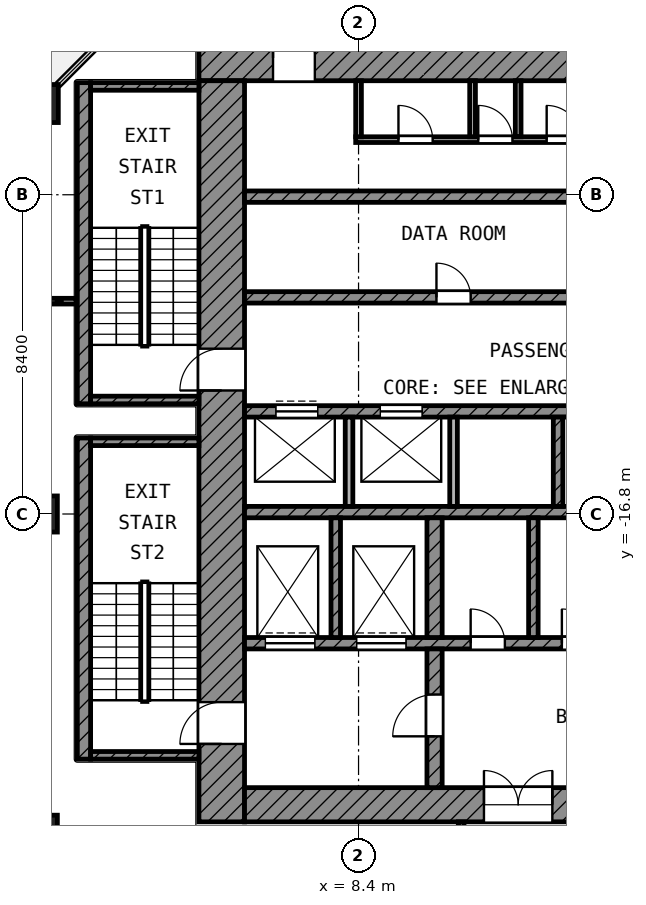
"""IFC4 building model, lengths in metres.
Left out: names, types, materials, properties, quantities, classifications, styles, units other than length and angle.
Written with IfcOpenShell. Run it as: python <this file> out.ifc"""

import sys

from ifc_helpers import new_model, si_unit, direction, frame, frame_2d, origin, origin_2d, place, context, subcontext, project, spatial, rectangle, extrude, element, fill, save


model = new_model("IFC4")
c1 = context("Model", 3, precision=1e-05, world=origin(), true_north=direction((0.0, 1.0)))
c2 = subcontext(c1, "Body", "Model", "MODEL_VIEW")
j1 = project(units=[si_unit("LENGTHUNIT", "METRE"), si_unit("PLANEANGLEUNIT", "RADIAN")], contexts=[c1])
p1 = place(None, origin())
s1 = spatial("IfcSite", under=j1, at=p1, CompositionType="ELEMENT")
p2 = place(p1, origin())
s2 = spatial("IfcBuilding", under=s1, at=p2, CompositionType="ELEMENT")
p3 = place(p2, frame((0.0, 0.0, 196.2)))
s3 = spatial("IfcBuildingStorey", under=s2, at=p3, CompositionType="ELEMENT", Elevation=196.2)
p4 = place(p3, frame((0.0, -6.0, 0.0), z_axis=(0.0, 0.0, 1.0), x_axis=(1.0, 0.0, 0.0)))
e1 = element("IfcColumn", 1, at=p4, inside=s3, PredefinedType="COLUMN", context=c2, shape_type="SweptSolid", body=[
    extrude(rectangle(XDim=1.0, YDim=1.0, at=origin_2d()), origin(), (0.0, 0.0, 1.0), 4.2),
])
for number, where, z_axis, x_axis in (
    (2, (0.0, -16.8, 0.0), (0.0, 0.0, 1.0), (1.0, 0.0, 0.0)),
    (3, (0.0, -25.2, 0.0), (0.0, 0.0, 1.0), (1.0, 0.0, 0.0)),
):
    element("IfcColumn", number, at=place(p3, frame(where, z_axis=z_axis, x_axis=x_axis)), inside=s3, PredefinedType="COLUMN", context=c2, shape_type="SweptSolid", body=[
        extrude(rectangle(XDim=0.95, YDim=0.95, at=origin_2d()), origin(), (0.0, 0.0, 1.0), 4.2),
    ])
p5 = place(p3, frame((4.2, -4.8, 0.0), z_axis=(0.0, 0.0, 1.0), x_axis=(1.0, 0.0, 0.0)))
e4 = element("IfcWall", 4, at=p5, inside=s3, PredefinedType="SHEAR", context=c2, shape_type="SweptSolid", body=[
    extrude(rectangle(XDim=20.7, YDim=1.2, at=frame_2d((10.35, 0.0))), origin(), (0.0, 0.0, 1.0), 3.6),
])
p6 = place(p5, frame((1.95, 0.0, 0.0)))
e5 = element("IfcOpeningElement", 5, at=p6, cuts=e4, PredefinedType="OPENING", context=c2, shape_type="SweptSolid", body=[
    extrude(rectangle(XDim=1.1, YDim=2.1, at=frame_2d((0.55, 1.05))), frame((0.0, 0.61, 0.0), z_axis=(0.0, -1.0, 0.0), x_axis=(1.0, 0.0, 0.0)), (0.0, 0.0, 1.0), 1.22),
])
p7 = place(p5, frame((17.95, 0.0, 0.0)))
e6 = element("IfcOpeningElement", 6, at=p7, cuts=e4, PredefinedType="OPENING", context=c2, shape_type="SweptSolid", body=[
    extrude(rectangle(XDim=1.1, YDim=2.1, at=frame_2d((0.55, 1.05))), frame((0.0, 0.61, 0.0), z_axis=(0.0, -1.0, 0.0), x_axis=(1.0, 0.0, 0.0)), (0.0, 0.0, 1.0), 1.22),
])
p8 = place(p3, frame((4.8, -24.9, 0.0), z_axis=(0.0, 0.0, 1.0), x_axis=(0.0, 1.0, 0.0)))
e7 = element("IfcWall", 7, at=p8, inside=s3, PredefinedType="SHEAR", context=c2, shape_type="SweptSolid", body=[
    extrude(rectangle(XDim=19.5, YDim=1.2, at=frame_2d((9.75, 0.0))), origin(), (0.0, 0.0, 1.0), 3.6),
])
p9 = place(p8, frame((11.35, 0.0, 0.0)))
e8 = element("IfcOpeningElement", 8, at=p9, cuts=e7, PredefinedType="OPENING", context=c2, shape_type="SweptSolid", body=[
    extrude(rectangle(XDim=1.1, YDim=2.1, at=frame_2d((0.55, 1.05))), frame((0.0, 0.61, 0.0), z_axis=(0.0, -1.0, 0.0), x_axis=(1.0, 0.0, 0.0)), (0.0, 0.0, 1.0), 1.22),
])
p10 = place(p8, frame((2.05, 0.0, 0.0)))
e9 = element("IfcOpeningElement", 9, at=p10, cuts=e7, PredefinedType="OPENING", context=c2, shape_type="SweptSolid", body=[
    extrude(rectangle(XDim=1.1, YDim=2.1, at=frame_2d((0.55, 1.05))), frame((0.0, 0.61, 0.0), z_axis=(0.0, -1.0, 0.0), x_axis=(1.0, 0.0, 0.0)), (0.0, 0.0, 1.0), 1.22),
])
p11 = place(p3, frame((5.4, -24.45, 0.0), z_axis=(0.0, 0.0, 1.0), x_axis=(1.0, 0.0, 0.0)))
e10 = element("IfcWall", 10, at=p11, inside=s3, PredefinedType="SHEAR", context=c2, shape_type="SweptSolid", body=[
    extrude(rectangle(XDim=18.6, YDim=0.9, at=frame_2d((9.3, 0.0))), origin(), (0.0, 0.0, 1.0), 3.6),
])
p12 = place(p11, frame((6.3, 0.0, 0.0)))
e11 = element("IfcOpeningElement", 11, at=p12, cuts=e10, PredefinedType="OPENING", context=c2, shape_type="SweptSolid", body=[
    extrude(rectangle(XDim=1.8, YDim=2.1, at=frame_2d((0.9, 1.05))), frame((0.0, 0.46, 0.0), z_axis=(0.0, -1.0, 0.0), x_axis=(1.0, 0.0, 0.0)), (0.0, 0.0, 1.0), 0.92),
])
p13 = place(p3, frame((5.4, -8.45, 0.0), z_axis=(0.0, 0.0, 1.0), x_axis=(1.0, 0.0, 0.0)))
e12 = element("IfcWall", 12, at=p13, inside=s3, PredefinedType="SHEAR", context=c2, shape_type="SweptSolid", body=[
    extrude(rectangle(XDim=16.65, YDim=0.3, at=frame_2d((8.325, 0.0))), origin(), (0.0, 0.0, 1.0), 3.6),
])
p14 = place(p3, frame((5.4, -11.1, 0.0), z_axis=(0.0, 0.0, 1.0), x_axis=(1.0, 0.0, 0.0)))
e13 = element("IfcWall", 13, at=p14, inside=s3, PredefinedType="SHEAR", context=c2, shape_type="SweptSolid", body=[
    extrude(rectangle(XDim=16.65, YDim=0.3, at=frame_2d((8.325, 0.0))), origin(), (0.0, 0.0, 1.0), 3.6),
])
p15 = place(p14, frame((11.825, 0.0, 0.0)))
e14 = element("IfcOpeningElement", 14, at=p15, cuts=e13, PredefinedType="OPENING", context=c2, shape_type="SweptSolid", body=[
    extrude(rectangle(XDim=1.1, YDim=2.1, at=frame_2d((0.55, 1.05))), frame((0.0, 0.16, 0.0), z_axis=(0.0, -1.0, 0.0), x_axis=(1.0, 0.0, 0.0)), (0.0, 0.0, 1.0), 0.32),
])
p16 = place(p14, frame((14.575, 0.0, 0.0)))
e15 = element("IfcOpeningElement", 15, at=p16, cuts=e13, PredefinedType="OPENING", context=c2, shape_type="SweptSolid", body=[
    extrude(rectangle(XDim=1.1, YDim=2.1, at=frame_2d((0.55, 1.05))), frame((0.0, 0.16, 0.0), z_axis=(0.0, -1.0, 0.0), x_axis=(1.0, 0.0, 0.0)), (0.0, 0.0, 1.0), 0.32),
])
p17 = place(p14, frame((5.05, 0.0, 0.0)))
e16 = element("IfcOpeningElement", 16, at=p17, cuts=e13, PredefinedType="OPENING", context=c2, shape_type="SweptSolid", body=[
    extrude(rectangle(XDim=0.9, YDim=2.1, at=frame_2d((0.45, 1.05))), frame((0.0, 0.16, 0.0), z_axis=(0.0, -1.0, 0.0), x_axis=(1.0, 0.0, 0.0)), (0.0, 0.0, 1.0), 0.32),
])
p18 = place(p3, frame((5.4, -14.1, 0.0), z_axis=(0.0, 0.0, 1.0), x_axis=(1.0, 0.0, 0.0)))
e17 = element("IfcWall", 17, at=p18, inside=s3, PredefinedType="SHEAR", context=c2, shape_type="SweptSolid", body=[
    extrude(rectangle(XDim=16.65, YDim=0.3, at=frame_2d((8.325, 0.0))), origin(), (0.0, 0.0, 1.0), 3.6),
])
p19 = place(p18, frame((0.825, 0.0, 0.0)))
e18 = element("IfcOpeningElement", 18, at=p19, cuts=e17, PredefinedType="OPENING", context=c2, shape_type="SweptSolid", body=[
    extrude(rectangle(XDim=1.1, YDim=2.1, at=frame_2d((0.55, 1.05))), frame((0.0, 0.16, 0.0), z_axis=(0.0, -1.0, 0.0), x_axis=(1.0, 0.0, 0.0)), (0.0, 0.0, 1.0), 0.32),
])
p20 = place(p18, frame((3.575, 0.0, 0.0)))
e19 = element("IfcOpeningElement", 19, at=p20, cuts=e17, PredefinedType="OPENING", context=c2, shape_type="SweptSolid", body=[
    extrude(rectangle(XDim=1.1, YDim=2.1, at=frame_2d((0.55, 1.05))), frame((0.0, 0.16, 0.0), z_axis=(0.0, -1.0, 0.0), x_axis=(1.0, 0.0, 0.0)), (0.0, 0.0, 1.0), 0.32),
])
p21 = place(p3, frame((5.4, -16.75, 0.0), z_axis=(0.0, 0.0, 1.0), x_axis=(1.0, 0.0, 0.0)))
e20 = element("IfcWall", 20, at=p21, inside=s3, PredefinedType="SHEAR", context=c2, shape_type="SweptSolid", body=[
    extrude(rectangle(XDim=16.65, YDim=0.3, at=frame_2d((8.325, 0.0))), origin(), (0.0, 0.0, 1.0), 3.6),
])
p22 = place(p3, frame((5.4, -20.2, 0.0), z_axis=(0.0, 0.0, 1.0), x_axis=(1.0, 0.0, 0.0)))
e21 = element("IfcWall", 21, at=p22, inside=s3, PredefinedType="SHEAR", context=c2, shape_type="SweptSolid", body=[
    extrude(rectangle(XDim=14.65, YDim=0.3, at=frame_2d((7.325, 0.0))), origin(), (0.0, 0.0, 1.0), 3.6),
])
p23 = place(p22, frame((10.55, 0.0, 0.0)))
e22 = element("IfcOpeningElement", 22, at=p23, cuts=e21, PredefinedType="OPENING", context=c2, shape_type="SweptSolid", body=[
    extrude(rectangle(XDim=1.3, YDim=2.1, at=frame_2d((0.65, 1.05))), frame((0.0, 0.16, 0.0), z_axis=(0.0, -1.0, 0.0), x_axis=(1.0, 0.0, 0.0)), (0.0, 0.0, 1.0), 0.32),
])
p24 = place(p22, frame((12.95, 0.0, 0.0)))
e23 = element("IfcOpeningElement", 23, at=p24, cuts=e21, PredefinedType="OPENING", context=c2, shape_type="SweptSolid", body=[
    extrude(rectangle(XDim=1.3, YDim=2.1, at=frame_2d((0.65, 1.05))), frame((0.0, 0.16, 0.0), z_axis=(0.0, -1.0, 0.0), x_axis=(1.0, 0.0, 0.0)), (0.0, 0.0, 1.0), 0.32),
])
p25 = place(p22, frame((0.55, 0.0, 0.0)))
e24 = element("IfcOpeningElement", 24, at=p25, cuts=e21, PredefinedType="OPENING", context=c2, shape_type="SweptSolid", body=[
    extrude(rectangle(XDim=1.3, YDim=2.1, at=frame_2d((0.65, 1.05))), frame((0.0, 0.16, 0.0), z_axis=(0.0, -1.0, 0.0), x_axis=(1.0, 0.0, 0.0)), (0.0, 0.0, 1.0), 0.32),
])
p26 = place(p22, frame((2.95, 0.0, 0.0)))
e25 = element("IfcOpeningElement", 25, at=p26, cuts=e21, PredefinedType="OPENING", context=c2, shape_type="SweptSolid", body=[
    extrude(rectangle(XDim=1.3, YDim=2.1, at=frame_2d((0.65, 1.05))), frame((0.0, 0.16, 0.0), z_axis=(0.0, -1.0, 0.0), x_axis=(1.0, 0.0, 0.0)), (0.0, 0.0, 1.0), 0.32),
])
p27 = place(p22, frame((5.95, 0.0, 0.0)))
e26 = element("IfcOpeningElement", 26, at=p27, cuts=e21, PredefinedType="OPENING", context=c2, shape_type="SweptSolid", body=[
    extrude(rectangle(XDim=0.9, YDim=2.1, at=frame_2d((0.45, 1.05))), frame((0.0, 0.16, 0.0), z_axis=(0.0, -1.0, 0.0), x_axis=(1.0, 0.0, 0.0)), (0.0, 0.0, 1.0), 0.32),
])
p28 = place(p22, frame((8.35, 0.0, 0.0)))
e27 = element("IfcOpeningElement", 27, at=p28, cuts=e21, PredefinedType="OPENING", context=c2, shape_type="SweptSolid", body=[
    extrude(rectangle(XDim=0.9, YDim=2.1, at=frame_2d((0.45, 1.05))), frame((0.0, 0.16, 0.0), z_axis=(0.0, -1.0, 0.0), x_axis=(1.0, 0.0, 0.0)), (0.0, 0.0, 1.0), 0.32),
])
p29 = place(p3, frame((10.4, -24.0, 0.0), z_axis=(0.0, 0.0, 1.0), x_axis=(0.0, 1.0, 0.0)))
e28 = element("IfcWall", 28, at=p29, inside=s3, PredefinedType="SHEAR", context=c2, shape_type="SweptSolid", body=[
    extrude(rectangle(XDim=3.65, YDim=0.4, at=frame_2d((1.825, 0.0))), origin(), (0.0, 0.0, 1.0), 3.6),
])
p30 = place(p29, frame((1.35, 0.0, 0.0)))
e29 = element("IfcOpeningElement", 29, at=p30, cuts=e28, PredefinedType="OPENING", context=c2, shape_type="SweptSolid", body=[
    extrude(rectangle(XDim=1.1, YDim=2.1, at=frame_2d((0.55, 1.05))), frame((0.0, 0.21, 0.0), z_axis=(0.0, -1.0, 0.0), x_axis=(1.0, 0.0, 0.0)), (0.0, 0.0, 1.0), 0.42),
])
p31 = place(p3, frame((10.4, -20.05, 0.0), z_axis=(0.0, 0.0, 1.0), x_axis=(0.0, 1.0, 0.0)))
e30 = element("IfcWall", 30, at=p31, inside=s3, PredefinedType="SHEAR", context=c2, shape_type="SweptSolid", body=[
    extrude(rectangle(XDim=3.15, YDim=0.4, at=frame_2d((1.575, 0.0))), origin(), (0.0, 0.0, 1.0), 3.6),
])
for number, where, z_axis, x_axis in (
    (31, (7.8, -20.05, 0.0), (0.0, 0.0, 1.0), (0.0, 1.0, 0.0)),
    (32, (13.0, -20.05, 0.0), (0.0, 0.0, 1.0), (0.0, 1.0, 0.0)),
):
    element("IfcWall", number, at=place(p3, frame(where, z_axis=z_axis, x_axis=x_axis)), inside=s3, PredefinedType="SHEAR", context=c2, shape_type="SweptSolid", body=[
        extrude(rectangle(XDim=3.15, YDim=0.25, at=frame_2d((1.575, 0.0))), origin(), (0.0, 0.0, 1.0), 3.6),
    ])
for number, where, z_axis, x_axis in (
    (33, (8.15, -16.6, 0.0), (0.0, 0.0, 1.0), (0.0, 1.0, 0.0)),
    (34, (10.9, -16.6, 0.0), (0.0, 0.0, 1.0), (0.0, 1.0, 0.0)),
):
    element("IfcWall", number, at=place(p3, frame(where, z_axis=z_axis, x_axis=x_axis)), inside=s3, PredefinedType="PARTITIONING", context=c2, shape_type="SweptSolid", body=[
        extrude(rectangle(XDim=2.35, YDim=0.2, at=frame_2d((1.175, 0.0))), origin(), (0.0, 0.0, 1.0), 3.6),
    ])
p32 = place(p3, frame((13.65, -16.6, 0.0), z_axis=(0.0, 0.0, 1.0), x_axis=(0.0, 1.0, 0.0)))
e35 = element("IfcWall", 35, at=p32, inside=s3, PredefinedType="SHEAR", context=c2, shape_type="SweptSolid", body=[
    extrude(rectangle(XDim=2.35, YDim=0.25, at=frame_2d((1.175, 0.0))), origin(), (0.0, 0.0, 1.0), 3.6),
])
p33 = place(p3, frame((8.325, -6.95, 0.0), z_axis=(0.0, 0.0, 1.0), x_axis=(1.0, 0.0, 0.0)))
e36 = element("IfcWall", 36, at=p33, inside=s3, PredefinedType="PARTITIONING", context=c2, shape_type="SweptSolid", body=[
    extrude(rectangle(XDim=12.75, YDim=0.15, at=frame_2d((6.375, 0.0))), origin(), (0.0, 0.0, 1.0), 3.6),
])
p34 = place(p33, frame((1.125, 0.0, 0.0)))
e37 = element("IfcOpeningElement", 37, at=p34, cuts=e36, PredefinedType="OPENING", context=c2, shape_type="SweptSolid", body=[
    extrude(rectangle(XDim=0.9, YDim=2.1, at=frame_2d((0.45, 1.05))), frame((0.0, 0.085, 0.0), z_axis=(0.0, -1.0, 0.0), x_axis=(1.0, 0.0, 0.0)), (0.0, 0.0, 1.0), 0.17),
])
p35 = place(p33, frame((3.225, 0.0, 0.0)))
e38 = element("IfcOpeningElement", 38, at=p35, cuts=e36, PredefinedType="OPENING", context=c2, shape_type="SweptSolid", body=[
    extrude(rectangle(XDim=0.9, YDim=2.1, at=frame_2d((0.45, 1.05))), frame((0.0, 0.085, 0.0), z_axis=(0.0, -1.0, 0.0), x_axis=(1.0, 0.0, 0.0)), (0.0, 0.0, 1.0), 0.17),
])
p36 = place(p33, frame((5.025, 0.0, 0.0)))
e39 = element("IfcOpeningElement", 39, at=p36, cuts=e36, PredefinedType="OPENING", context=c2, shape_type="SweptSolid", body=[
    extrude(rectangle(XDim=0.9, YDim=2.1, at=frame_2d((0.45, 1.05))), frame((0.0, 0.085, 0.0), z_axis=(0.0, -1.0, 0.0), x_axis=(1.0, 0.0, 0.0)), (0.0, 0.0, 1.0), 0.17),
])
p37 = place(p33, frame((7.425, 0.0, 0.0)))
e40 = element("IfcOpeningElement", 40, at=p37, cuts=e36, PredefinedType="OPENING", context=c2, shape_type="SweptSolid", body=[
    extrude(rectangle(XDim=0.9, YDim=2.1, at=frame_2d((0.45, 1.05))), frame((0.0, 0.085, 0.0), z_axis=(0.0, -1.0, 0.0), x_axis=(1.0, 0.0, 0.0)), (0.0, 0.0, 1.0), 0.17),
])
p38 = place(p33, frame((9.525, 0.0, 0.0)))
e41 = element("IfcOpeningElement", 41, at=p38, cuts=e36, PredefinedType="OPENING", context=c2, shape_type="SweptSolid", body=[
    extrude(rectangle(XDim=0.9, YDim=2.1, at=frame_2d((0.45, 1.05))), frame((0.0, 0.085, 0.0), z_axis=(0.0, -1.0, 0.0), x_axis=(1.0, 0.0, 0.0)), (0.0, 0.0, 1.0), 0.17),
])
p39 = place(p33, frame((11.325, 0.0, 0.0)))
e42 = element("IfcOpeningElement", 42, at=p39, cuts=e36, PredefinedType="OPENING", context=c2, shape_type="SweptSolid", body=[
    extrude(rectangle(XDim=0.9, YDim=2.1, at=frame_2d((0.45, 1.05))), frame((0.0, 0.085, 0.0), z_axis=(0.0, -1.0, 0.0), x_axis=(1.0, 0.0, 0.0)), (0.0, 0.0, 1.0), 0.17),
])
for number, where, z_axis, x_axis in (
    (43, (8.4, -6.875, 0.0), (0.0, 0.0, 1.0), (0.0, 1.0, 0.0)),
    (44, (11.4, -6.875, 0.0), (0.0, 0.0, 1.0), (0.0, 1.0, 0.0)),
    (45, (12.6, -6.875, 0.0), (0.0, 0.0, 1.0), (0.0, 1.0, 0.0)),
):
    element("IfcWall", number, at=place(p3, frame(where, z_axis=z_axis, x_axis=x_axis)), inside=s3, PredefinedType="PARTITIONING", context=c2, shape_type="SweptSolid", body=[
        extrude(rectangle(XDim=1.475, YDim=0.15, at=frame_2d((0.738, 0.0))), origin(), (0.0, 0.0, 1.0), 3.6),
    ])
p40 = place(p3, frame((1.175, -13.9, 0.0), z_axis=(0.0, 0.0, 1.0), x_axis=(0.0, 1.0, 0.0)))
e46 = element("IfcWall", 46, at=p40, inside=s3, PredefinedType="SHEAR", context=c2, shape_type="SweptSolid", body=[
    extrude(rectangle(XDim=8.45, YDim=0.35, at=frame_2d((4.225, 0.0))), origin(), (0.0, 0.0, 1.0), 3.6),
])
for number, where, z_axis, x_axis in (
    (47, (1.35, -5.55, 0.0), (0.0, 0.0, 1.0), (1.0, 0.0, 0.0)),
    (48, (1.35, -13.8, 0.0), (0.0, 0.0, 1.0), (1.0, 0.0, 0.0)),
):
    element("IfcWall", number, at=place(p3, frame(where, z_axis=z_axis, x_axis=x_axis)), inside=s3, PredefinedType="SHEAR", context=c2, shape_type="SweptSolid", body=[
        extrude(rectangle(XDim=2.85, YDim=0.2, at=frame_2d((1.425, 0.0))), origin(), (0.0, 0.0, 1.0), 3.6),
    ])
p41 = place(p3, frame((1.175, -23.25, 0.0), z_axis=(0.0, 0.0, 1.0), x_axis=(0.0, 1.0, 0.0)))
e49 = element("IfcWall", 49, at=p41, inside=s3, PredefinedType="SHEAR", context=c2, shape_type="SweptSolid", body=[
    extrude(rectangle(XDim=8.45, YDim=0.35, at=frame_2d((4.225, 0.0))), origin(), (0.0, 0.0, 1.0), 3.6),
])
for number, where, z_axis, x_axis in (
    (50, (1.35, -14.9, 0.0), (0.0, 0.0, 1.0), (1.0, 0.0, 0.0)),
    (51, (1.35, -23.15, 0.0), (0.0, 0.0, 1.0), (1.0, 0.0, 0.0)),
):
    element("IfcWall", number, at=place(p3, frame(where, z_axis=z_axis, x_axis=x_axis)), inside=s3, PredefinedType="SHEAR", context=c2, shape_type="SweptSolid", body=[
        extrude(rectangle(XDim=2.85, YDim=0.2, at=frame_2d((1.425, 0.0))), origin(), (0.0, 0.0, 1.0), 3.6),
    ])
p42 = place(p3, frame((0.08, -11.2, 0.0), z_axis=(0.0, 0.0, 1.0), x_axis=(1.0, 0.0, 0.0)))
e52 = element("IfcWall", 52, at=p42, inside=s3, PredefinedType="PARTITIONING", context=c2, shape_type="SweptSolid", body=[
    extrude(rectangle(XDim=0.89, YDim=0.15, at=frame_2d((0.445, 0.0))), origin(), (0.0, 0.0, 1.0), 3.6),
])
p43 = place(p3, frame((11.1, -29.398, 0.0), z_axis=(0.0, 0.0, 1.0), x_axis=(0.0, 1.0, 0.0)))
e53 = element("IfcWall", 53, at=p43, inside=s3, PredefinedType="PARTITIONING", context=c2, shape_type="SweptSolid", body=[
    extrude(rectangle(XDim=4.498, YDim=0.15, at=frame_2d((2.249, 0.0))), origin(), (0.0, 0.0, 1.0), 3.6),
])
p44 = place(p19, origin())
e54 = element("IfcDoor", 54, at=p44, inside=s3, OperationType="DOUBLE_DOOR_SLIDING", PredefinedType="DOOR", context=c2, shape_type="SweptSolid", body=[
    extrude(rectangle(XDim=1.1, YDim=2.1, at=frame_2d((0.55, 1.05))), frame((0.0, 0.025, 0.0), z_axis=(0.0, -1.0, 0.0), x_axis=(1.0, 0.0, 0.0)), (0.0, 0.0, 1.0), 0.05),
])
fill(e18, e54)
p45 = place(p20, origin())
e55 = element("IfcDoor", 55, at=p45, inside=s3, OperationType="DOUBLE_DOOR_SLIDING", PredefinedType="DOOR", context=c2, shape_type="SweptSolid", body=[
    extrude(rectangle(XDim=1.1, YDim=2.1, at=frame_2d((0.55, 1.05))), frame((0.0, 0.025, 0.0), z_axis=(0.0, -1.0, 0.0), x_axis=(1.0, 0.0, 0.0)), (0.0, 0.0, 1.0), 0.05),
])
fill(e19, e55)
p46 = place(p25, origin())
e56 = element("IfcDoor", 56, at=p46, inside=s3, OperationType="DOUBLE_DOOR_SLIDING", PredefinedType="DOOR", context=c2, shape_type="SweptSolid", body=[
    extrude(rectangle(XDim=1.3, YDim=2.1, at=frame_2d((0.65, 1.05))), frame((0.0, 0.025, 0.0), z_axis=(0.0, -1.0, 0.0), x_axis=(1.0, 0.0, 0.0)), (0.0, 0.0, 1.0), 0.05),
])
fill(e24, e56)
p47 = place(p26, origin())
e57 = element("IfcDoor", 57, at=p47, inside=s3, OperationType="DOUBLE_DOOR_SLIDING", PredefinedType="DOOR", context=c2, shape_type="SweptSolid", body=[
    extrude(rectangle(XDim=1.3, YDim=2.1, at=frame_2d((0.65, 1.05))), frame((0.0, 0.025, 0.0), z_axis=(0.0, -1.0, 0.0), x_axis=(1.0, 0.0, 0.0)), (0.0, 0.0, 1.0), 0.05),
])
fill(e25, e57)
p48 = place(p9, origin())
e58 = element("IfcDoor", 58, at=p48, inside=s3, OperationType="SINGLE_SWING_LEFT", PredefinedType="DOOR", context=c2, shape_type="SweptSolid", body=[
    extrude(rectangle(XDim=1.1, YDim=2.1, at=frame_2d((0.55, 1.05))), frame((0.0, 0.025, 0.0), z_axis=(0.0, -1.0, 0.0), x_axis=(1.0, 0.0, 0.0)), (0.0, 0.0, 1.0), 0.05),
])
fill(e8, e58)
p49 = place(p10, origin())
e59 = element("IfcDoor", 59, at=p49, inside=s3, OperationType="SINGLE_SWING_LEFT", PredefinedType="DOOR", context=c2, shape_type="SweptSolid", body=[
    extrude(rectangle(XDim=1.1, YDim=2.1, at=frame_2d((0.55, 1.05))), frame((0.0, 0.025, 0.0), z_axis=(0.0, -1.0, 0.0), x_axis=(1.0, 0.0, 0.0)), (0.0, 0.0, 1.0), 0.05),
])
fill(e9, e59)
p50 = place(p6, origin())
e60 = element("IfcDoor", 60, at=p50, inside=s3, OperationType="SINGLE_SWING_LEFT", PredefinedType="DOOR", context=c2, shape_type="SweptSolid", body=[
    extrude(rectangle(XDim=1.1, YDim=2.1, at=frame_2d((0.55, 1.05))), frame((0.0, 0.025, 0.0), z_axis=(0.0, -1.0, 0.0), x_axis=(1.0, 0.0, 0.0)), (0.0, 0.0, 1.0), 0.05),
])
fill(e5, e60)
p51 = place(p30, origin())
e61 = element("IfcDoor", 61, at=p51, inside=s3, OperationType="SINGLE_SWING_LEFT", PredefinedType="DOOR", context=c2, shape_type="SweptSolid", body=[
    extrude(rectangle(XDim=1.1, YDim=2.1, at=frame_2d((0.55, 1.05))), frame((0.0, 0.025, 0.0), z_axis=(0.0, -1.0, 0.0), x_axis=(1.0, 0.0, 0.0)), (0.0, 0.0, 1.0), 0.05),
])
fill(e29, e61)
p52 = place(p12, origin())
e62 = element("IfcDoor", 62, at=p52, inside=s3, OperationType="DOUBLE_DOOR_SINGLE_SWING", PredefinedType="DOOR", context=c2, shape_type="SweptSolid", body=[
    extrude(rectangle(XDim=1.8, YDim=2.1, at=frame_2d((0.9, 1.05))), frame((0.0, 0.025, 0.0), z_axis=(0.0, -1.0, 0.0), x_axis=(1.0, 0.0, 0.0)), (0.0, 0.0, 1.0), 0.05),
])
fill(e11, e62)
p53 = place(p34, origin())
e63 = element("IfcDoor", 63, at=p53, inside=s3, OperationType="SINGLE_SWING_LEFT", PredefinedType="DOOR", context=c2, shape_type="SweptSolid", body=[
    extrude(rectangle(XDim=0.9, YDim=2.1, at=frame_2d((0.45, 1.05))), frame((0.0, 0.025, 0.0), z_axis=(0.0, -1.0, 0.0), x_axis=(1.0, 0.0, 0.0)), (0.0, 0.0, 1.0), 0.05),
])
fill(e37, e63)
p54 = place(p35, origin())
e64 = element("IfcDoor", 64, at=p54, inside=s3, OperationType="SINGLE_SWING_LEFT", PredefinedType="DOOR", context=c2, shape_type="SweptSolid", body=[
    extrude(rectangle(XDim=0.9, YDim=2.1, at=frame_2d((0.45, 1.05))), frame((0.0, 0.025, 0.0), z_axis=(0.0, -1.0, 0.0), x_axis=(1.0, 0.0, 0.0)), (0.0, 0.0, 1.0), 0.05),
])
fill(e38, e64)
p55 = place(p36, origin())
e65 = element("IfcDoor", 65, at=p55, inside=s3, OperationType="SINGLE_SWING_LEFT", PredefinedType="DOOR", context=c2, shape_type="SweptSolid", body=[
    extrude(rectangle(XDim=0.9, YDim=2.1, at=frame_2d((0.45, 1.05))), frame((0.0, 0.025, 0.0), z_axis=(0.0, -1.0, 0.0), x_axis=(1.0, 0.0, 0.0)), (0.0, 0.0, 1.0), 0.05),
])
fill(e39, e65)
p56 = place(p27, origin())
e66 = element("IfcDoor", 66, at=p56, inside=s3, OperationType="SINGLE_SWING_LEFT", PredefinedType="DOOR", context=c2, shape_type="SweptSolid", body=[
    extrude(rectangle(XDim=0.9, YDim=2.1, at=frame_2d((0.45, 1.05))), frame((0.0, 0.025, 0.0), z_axis=(0.0, -1.0, 0.0), x_axis=(1.0, 0.0, 0.0)), (0.0, 0.0, 1.0), 0.05),
])
fill(e26, e66)
p57 = place(p28, origin())
e67 = element("IfcDoor", 67, at=p57, inside=s3, OperationType="SINGLE_SWING_LEFT", PredefinedType="DOOR", context=c2, shape_type="SweptSolid", body=[
    extrude(rectangle(XDim=0.9, YDim=2.1, at=frame_2d((0.45, 1.05))), frame((0.0, 0.025, 0.0), z_axis=(0.0, -1.0, 0.0), x_axis=(1.0, 0.0, 0.0)), (0.0, 0.0, 1.0), 0.05),
])
fill(e27, e67)
p58 = place(p17, origin())
e68 = element("IfcDoor", 68, at=p58, inside=s3, OperationType="SINGLE_SWING_LEFT", PredefinedType="DOOR", context=c2, shape_type="SweptSolid", body=[
    extrude(rectangle(XDim=0.9, YDim=2.1, at=frame_2d((0.45, 1.05))), frame((0.0, 0.025, 0.0), z_axis=(0.0, -1.0, 0.0), x_axis=(1.0, 0.0, 0.0)), (0.0, 0.0, 1.0), 0.05),
])
fill(e16, e68)
save(model, sys.argv[1])
